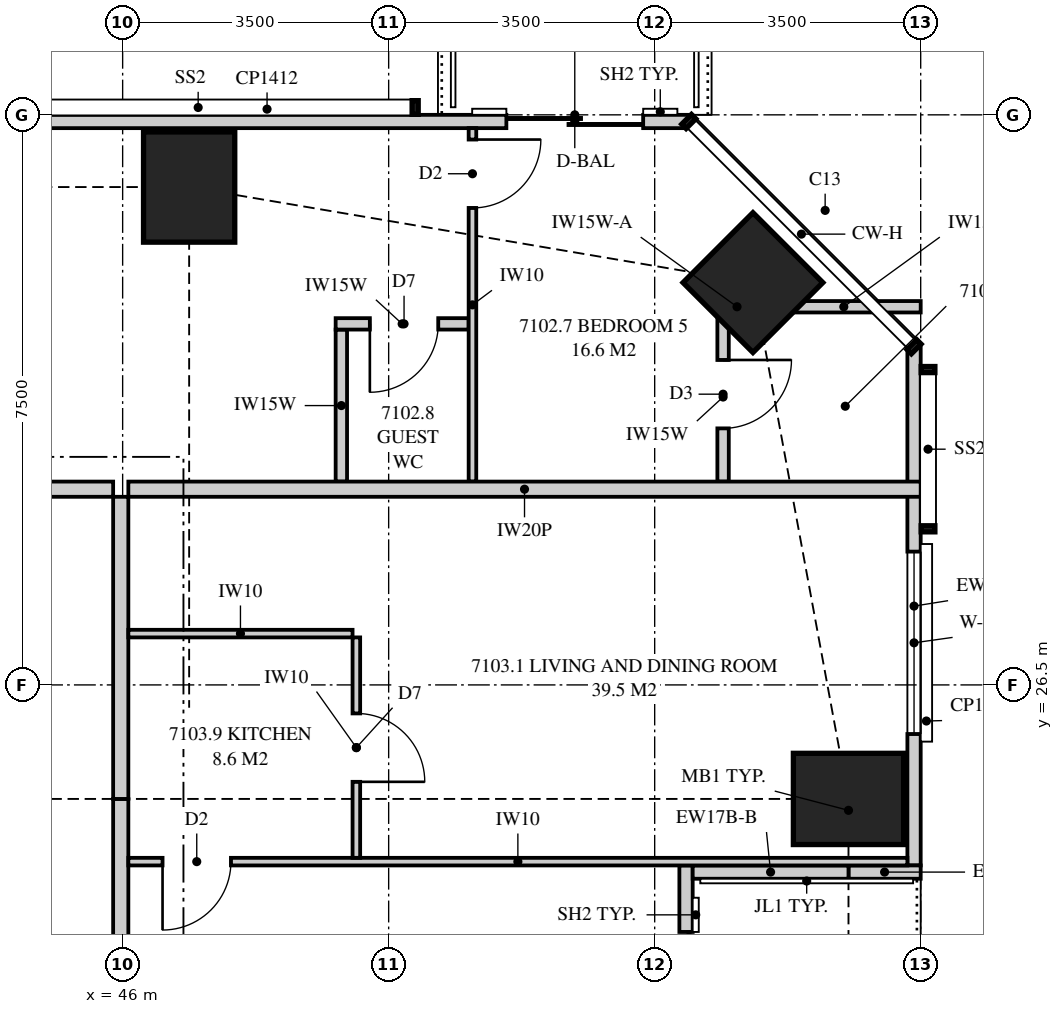
"""IFC4 building model, lengths in metres.
Left out: names, types, materials, properties, quantities, classifications, styles, units other than length and angle.
Written with IfcOpenShell. Run it as: python <this file> out.ifc"""

import sys

from ifc_helpers import new_model, si_unit, direction, frame, frame_2d, origin, origin_2d, place, context, subcontext, project, spatial, polyline, rectangle, outline, extrude, element, fill, save


model = new_model("IFC4")
c1 = context("Model", 3, precision=1e-05, world=origin(), true_north=direction((0.0, 1.0)))
c2 = subcontext(c1, "Body", "Model", "MODEL_VIEW")
j1 = project(units=[si_unit("LENGTHUNIT", "METRE"), si_unit("PLANEANGLEUNIT", "RADIAN")], contexts=[c1])
p1 = place(None, origin())
s1 = spatial("IfcSite", under=j1, at=p1, CompositionType="ELEMENT")
p2 = place(p1, origin())
s2 = spatial("IfcBuilding", under=s1, at=p2, CompositionType="ELEMENT")
p3 = place(p2, frame((0.0, 0.0, 259.95)))
s3 = spatial("IfcBuildingStorey", under=s2, at=p3, CompositionType="ELEMENT", Elevation=259.95)
p4 = place(p3, frame((55.55, 25.0, 0.0), z_axis=(0.0, 0.0, 1.0), x_axis=(1.0, 0.0, 0.0)))
e1 = element("IfcColumn", 1, at=p4, inside=s3, PredefinedType="COLUMN", context=c2, shape_type="SweptSolid", body=[
    extrude(rectangle(XDim=1.45, YDim=1.2, at=origin_2d()), origin(), (0.0, 0.0, 1.0), 3.9),
])
p5 = place(p3, frame((54.293, 31.793, 0.0), z_axis=(0.0, 0.0, 1.0), x_axis=(0.707106781187, 0.707106781187, 0.0)))
e2 = element("IfcColumn", 2, at=p5, inside=s3, PredefinedType="COLUMN", context=c2, shape_type="SweptSolid", body=[
    extrude(rectangle(XDim=1.3, YDim=1.3, at=origin_2d()), origin(), (0.0, 0.0, 1.0), 3.9),
])
p6 = place(p3, frame((46.875, 33.05, 0.0), z_axis=(0.0, 0.0, 1.0), x_axis=(0.0, 1.0, 0.0)))
e3 = element("IfcColumn", 3, at=p6, inside=s3, PredefinedType="COLUMN", context=c2, shape_type="SweptSolid", body=[
    extrude(rectangle(XDim=1.45, YDim=1.2, at=origin_2d()), origin(), (0.0, 0.0, 1.0), 3.9),
])
p7 = place(p3, frame((56.413, 24.125, 0.0), z_axis=(0.0, 0.0, 1.0), x_axis=(0.0, 1.0, 0.0)))
e4 = element("IfcWall", 4, at=p7, inside=s3, PredefinedType="SOLIDWALL", context=c2, shape_type="SweptSolid", body=[
    extrude(outline(polyline([(0.0, 0.0), (6.824, 0.0), (6.824, 3.66), (1.083, 3.66), (1.083, 2.7), (1.018, 2.7), (1.018, 3.66), (0.875, 3.66), (0.875, 2.7), (0.0, 2.7), (0.0, 0.0)])), frame((0.0, 0.087, 0.0), z_axis=(0.0, -1.0, 0.0), x_axis=(1.0, 0.0, 0.0)), (0.0, 0.0, 1.0), 0.175),
])
p8 = place(p7, frame((1.729, 0.0, 0.4)))
e5 = element("IfcOpeningElement", 5, at=p8, cuts=e4, PredefinedType="OPENING", context=c2, shape_type="SweptSolid", body=[
    extrude(rectangle(XDim=2.4, YDim=2.0, at=frame_2d((1.2, 1.0))), frame((0.0, 0.097, 0.0), z_axis=(0.0, -1.0, 0.0), x_axis=(1.0, 0.0, 0.0)), (0.0, 0.0, 1.0), 0.195),
])
p9 = place(p3, frame((53.413, 20.575, 0.0), z_axis=(0.0, 0.0, 1.0), x_axis=(0.0, 1.0, 0.0)))
e6 = element("IfcWall", 6, at=p9, inside=s3, PredefinedType="SOLIDWALL", context=c2, shape_type="SweptSolid", body=[
    extrude(outline(polyline([(0.0, 0.0), (3.55, 0.0), (3.55, 3.06), (3.225, 3.06), (3.225, 3.66), (0.0, 3.66), (0.0, 0.0)])), frame((0.0, 0.087, 0.0), z_axis=(0.0, -1.0, 0.0), x_axis=(1.0, 0.0, 0.0)), (0.0, 0.0, 1.0), 0.175),
])
p10 = place(p9, frame((0.875, 0.0, 0.0)))
e7 = element("IfcOpeningElement", 7, at=p10, cuts=e6, PredefinedType="OPENING", context=c2, shape_type="SweptSolid", body=[
    extrude(rectangle(XDim=1.8, YDim=2.4, at=frame_2d((0.9, 1.2))), frame((0.0, 0.097, 0.0), z_axis=(0.0, -1.0, 0.0), x_axis=(1.0, 0.0, 0.0)), (0.0, 0.0, 1.0), 0.195),
])
p11 = place(p3, frame((56.5, 24.038, 0.0), z_axis=(0.0, 0.0, 1.0), x_axis=(-1.0, 0.0, 0.0)))
e8 = element("IfcWall", 8, at=p11, inside=s3, PredefinedType="SOLIDWALL", context=c2, shape_type="SweptSolid", body=[
    extrude(outline(polyline([(0.0, 0.0), (0.95, 0.0), (0.95, 2.7), (0.15, 2.7), (0.15, 3.66), (0.0, 3.66), (0.0, 0.0)])), frame((0.0, 0.087, 0.0), z_axis=(0.0, -1.0, 0.0), x_axis=(1.0, 0.0, 0.0)), (0.0, 0.0, 1.0), 0.175),
])
p12 = place(p3, frame((55.55, 24.038, 0.0), z_axis=(0.0, 0.0, 1.0), x_axis=(-1.0, 0.0, 0.0)))
e9 = element("IfcWall", 9, at=p12, inside=s3, PredefinedType="SOLIDWALL", context=c2, shape_type="SweptSolid", body=[
    extrude(outline(polyline([(0.0, 0.0), (2.05, 0.0), (2.05, 3.06), (0.8, 3.06), (0.8, 2.7), (0.0, 2.7), (0.0, 0.0)])), frame((0.0, 0.087, 0.0), z_axis=(0.0, -1.0, 0.0), x_axis=(1.0, 0.0, 0.0)), (0.0, 0.0, 1.0), 0.175),
])
p13 = place(p3, frame((53.449, 33.913, 0.0), z_axis=(0.0, 0.0, 1.0), x_axis=(-1.0, 0.0, 0.0)))
e10 = element("IfcWall", 10, at=p13, inside=s3, PredefinedType="SOLIDWALL", context=c2, shape_type="SweptSolid", body=[
    extrude(outline(polyline([(0.0, 0.0), (33.597, 0.0), (33.597, 3.66), (26.039, 3.66), (26.039, 2.7), (25.955, 2.7), (25.955, 3.66), (25.824, 3.66), (25.824, 2.7), (6.574, 2.7), (6.574, 3.66), (6.442, 3.66), (6.442, 2.7), (6.359, 2.7), (6.359, 3.66), (0.0, 3.66), (0.0, 0.0)])), frame((0.0, 0.087, 0.0), z_axis=(0.0, -1.0, 0.0), x_axis=(1.0, 0.0, 0.0)), (0.0, 0.0, 1.0), 0.175),
])
p14 = place(p13, frame((0.6, 0.0, 0.0)))
e11 = element("IfcOpeningElement", 11, at=p14, cuts=e10, PredefinedType="OPENING", context=c2, shape_type="SweptSolid", body=[
    extrude(rectangle(XDim=1.8, YDim=2.4, at=frame_2d((0.9, 1.2))), frame((0.0, 0.097, 0.0), z_axis=(0.0, -1.0, 0.0), x_axis=(1.0, 0.0, 0.0)), (0.0, 0.0, 1.0), 0.195),
])
p15 = place(p13, frame((9.61, 0.0, 0.4)))
e12 = element("IfcOpeningElement", 12, at=p15, cuts=e10, PredefinedType="OPENING", context=c2, shape_type="SweptSolid", body=[
    extrude(rectangle(XDim=2.4, YDim=2.0, at=frame_2d((1.2, 1.0))), frame((0.0, 0.097, 0.0), z_axis=(0.0, -1.0, 0.0), x_axis=(1.0, 0.0, 0.0)), (0.0, 0.0, 1.0), 0.195),
])
p16 = place(p13, frame((19.524, 0.0, 0.4)))
e13 = element("IfcOpeningElement", 13, at=p16, cuts=e10, PredefinedType="OPENING", context=c2, shape_type="SweptSolid", body=[
    extrude(rectangle(XDim=2.1, YDim=2.25, at=frame_2d((1.05, 1.125))), frame((0.0, 0.097, 0.0), z_axis=(0.0, -1.0, 0.0), x_axis=(1.0, 0.0, 0.0)), (0.0, 0.0, 1.0), 0.195),
])
p17 = place(p13, frame((22.844, 0.0, 0.4)))
e14 = element("IfcOpeningElement", 14, at=p17, cuts=e10, PredefinedType="OPENING", context=c2, shape_type="SweptSolid", body=[
    extrude(rectangle(XDim=2.1, YDim=2.25, at=frame_2d((1.05, 1.125))), frame((0.0, 0.097, 0.0), z_axis=(0.0, -1.0, 0.0), x_axis=(1.0, 0.0, 0.0)), (0.0, 0.0, 1.0), 0.195),
])
p18 = place(p13, frame((29.123, 0.0, 0.4)))
e15 = element("IfcOpeningElement", 15, at=p18, cuts=e10, PredefinedType="OPENING", context=c2, shape_type="SweptSolid", body=[
    extrude(rectangle(XDim=2.1, YDim=2.25, at=frame_2d((1.05, 1.125))), frame((0.0, 0.097, 0.0), z_axis=(0.0, -1.0, 0.0), x_axis=(1.0, 0.0, 0.0)), (0.0, 0.0, 1.0), 0.195),
])
p19 = place(p3, frame((18.0, 29.075, 0.0), z_axis=(0.0, 0.0, 1.0), x_axis=(1.0, 0.0, 0.0)))
e16 = element("IfcWall", 16, at=p19, inside=s3, PredefinedType="PARTITIONING", context=c2, shape_type="SweptSolid", body=[
    extrude(outline(polyline([(0.0, 0.0), (27.875, 0.0), (27.875, 3.66), (27.875, 3.06), (27.565, 3.06), (27.565, 3.66), (20.56, 3.66), (20.56, 3.06), (17.94, 3.06), (17.94, 3.66), (10.935, 3.66), (10.935, 3.06), (8.315, 3.06), (8.315, 3.66), (2.192, 3.66), (2.192, 2.7), (0.256, 2.7), (0.256, 3.66), (0.0, 3.66), (0.0, 0.0)])), frame((0.0, 0.1, 0.0), z_axis=(0.0, -1.0, 0.0), x_axis=(1.0, 0.0, 0.0)), (0.0, 0.0, 1.0), 0.2),
])
p20 = place(p19, frame((18.75, 0.0, 0.0)))
e17 = element("IfcOpeningElement", 17, at=p20, cuts=e16, PredefinedType="OPENING", context=c2, shape_type="SweptSolid", body=[
    extrude(rectangle(XDim=1.05, YDim=2.2, at=frame_2d((0.525, 1.1))), frame((0.0, 0.11, 0.0), z_axis=(0.0, -1.0, 0.0), x_axis=(1.0, 0.0, 0.0)), (0.0, 0.0, 1.0), 0.22),
])
p21 = place(p3, frame((53.975, 31.475, 0.0), z_axis=(0.0, 0.0, 1.0), x_axis=(1.0, 0.0, 0.0)))
e18 = element("IfcWall", 18, at=p21, inside=s3, PredefinedType="PLUMBINGWALL", context=c2, shape_type="SweptSolid", body=[
    extrude(rectangle(XDim=0.217, YDim=0.15, at=frame_2d((0.108, 0.0))), origin(), (0.0, 0.0, 1.0), 2.7),
])
p22 = place(p3, frame((54.476, 31.475, 0.0), z_axis=(0.0, 0.0, 1.0), x_axis=(1.0, 0.0, 0.0)))
e19 = element("IfcWall", 19, at=p22, inside=s3, PredefinedType="PLUMBINGWALL", context=c2, shape_type="SweptSolid", body=[
    extrude(outline(polyline([(0.775, 3.66), (0.775, 2.7), (0.343, 2.7), (0.0, 1.35), (0.343, 0.0), (2.024, 0.0), (2.024, 3.66), (0.775, 3.66)])), frame((0.0, 0.075, 0.0), z_axis=(0.0, -1.0, 0.0), x_axis=(1.0, 0.0, 0.0)), (0.0, 0.0, 1.0), 0.15),
])
p23 = place(p3, frame((53.9, 31.4, 0.0), z_axis=(0.0, 0.0, 1.0), x_axis=(0.0, -1.0, 0.0)))
e20 = element("IfcWall", 20, at=p23, inside=s3, PredefinedType="PLUMBINGWALL", context=c2, shape_type="SweptSolid", body=[
    extrude(outline(polyline([(0.0, 0.0), (2.225, 0.0), (2.225, 3.66), (2.225, 2.7), (0.438, 2.7), (0.0, 2.7), (0.0, 3.66), (0.0, 0.0)])), frame((0.0, 0.075, 0.0), z_axis=(0.0, -1.0, 0.0), x_axis=(1.0, 0.0, 0.0)), (0.0, 0.0, 1.0), 0.15),
])
p24 = place(p23, frame((0.625, 0.0, 0.0)))
e21 = element("IfcOpeningElement", 21, at=p24, cuts=e20, PredefinedType="OPENING", context=c2, shape_type="SweptSolid", body=[
    extrude(rectangle(XDim=0.9, YDim=2.1, at=frame_2d((0.45, 1.05))), frame((0.0, 0.085, 0.0), z_axis=(0.0, -1.0, 0.0), x_axis=(1.0, 0.0, 0.0)), (0.0, 0.0, 1.0), 0.17),
])
p25 = place(p3, frame((50.603, 33.825, 0.0), z_axis=(0.0, 0.0, 1.0), x_axis=(0.0, -1.0, 0.0)))
e22 = element("IfcWall", 22, at=p25, inside=s3, PredefinedType="PARTITIONING", context=c2, shape_type="SweptSolid", body=[
    extrude(outline(polyline([(0.0, 0.0), (4.65, 0.0), (4.65, 3.66), (2.279, 3.66), (2.279, 2.7), (0.534, 2.7), (0.534, 3.66), (0.0, 3.66), (0.0, 0.0)])), frame((0.0, 0.05, 0.0), z_axis=(0.0, -1.0, 0.0), x_axis=(1.0, 0.0, 0.0)), (0.0, 0.0, 1.0), 0.1),
])
p26 = place(p25, frame((0.15, 0.0, 0.0)))
e23 = element("IfcOpeningElement", 23, at=p26, cuts=e22, PredefinedType="OPENING", context=c2, shape_type="SweptSolid", body=[
    extrude(rectangle(XDim=0.9, YDim=2.1, at=frame_2d((0.45, 1.05))), frame((0.0, 0.06, 0.0), z_axis=(0.0, -1.0, 0.0), x_axis=(1.0, 0.0, 0.0)), (0.0, 0.0, 1.0), 0.12),
])
p27 = place(p3, frame((46.075, 29.075, 0.0), z_axis=(0.0, 0.0, 1.0), x_axis=(1.0, 0.0, 0.0)))
e24 = element("IfcWall", 24, at=p27, inside=s3, PredefinedType="PARTITIONING", context=c2, shape_type="SweptSolid", body=[
    extrude(outline(polyline([(0.0, 0.0), (10.425, 0.0), (10.425, 3.66), (9.646, 3.66), (9.646, 2.7), (7.795, 2.7), (7.795, 3.66), (2.11, 3.66), (2.11, 3.06), (0.0, 3.06), (0.0, 3.66), (0.0, 0.0)])), frame((0.0, 0.1, 0.0), z_axis=(0.0, -1.0, 0.0), x_axis=(1.0, 0.0, 0.0)), (0.0, 0.0, 1.0), 0.2),
])
p28 = place(p3, frame((45.975, 13.0, 0.0), z_axis=(0.0, 0.0, 1.0), x_axis=(0.0, 1.0, 0.0)))
e25 = element("IfcWall", 25, at=p28, inside=s3, PredefinedType="PARTITIONING", context=c2, shape_type="SweptSolid", body=[
    extrude(outline(polyline([(0.0, 0.0), (12.0, 0.0), (12.0, 3.06), (10.69, 3.06), (10.69, 3.66), (7.06, 3.66), (7.06, 3.06), (4.44, 3.06), (4.44, 3.66), (1.31, 3.66), (1.31, 3.06), (0.0, 3.06), (0.0, 0.0)])), frame((0.0, 0.1, 0.0), z_axis=(0.0, -1.0, 0.0), x_axis=(1.0, 0.0, 0.0)), (0.0, 0.0, 1.0), 0.2),
])
p29 = place(p28, frame((7.925, 0.0, 0.0)))
e26 = element("IfcOpeningElement", 26, at=p29, cuts=e25, PredefinedType="OPENING", context=c2, shape_type="SweptSolid", body=[
    extrude(rectangle(XDim=1.05, YDim=2.2, at=frame_2d((0.525, 1.1))), frame((0.0, 0.11, 0.0), z_axis=(0.0, -1.0, 0.0), x_axis=(1.0, 0.0, 0.0)), (0.0, 0.0, 1.0), 0.22),
])
p30 = place(p3, frame((45.975, 25.0, 0.0), z_axis=(0.0, 0.0, 1.0), x_axis=(0.0, 1.0, 0.0)))
e27 = element("IfcWall", 27, at=p30, inside=s3, PredefinedType="PARTITIONING", context=c2, shape_type="SweptSolid", body=[
    extrude(rectangle(XDim=3.975, YDim=0.2, at=frame_2d((1.988, 0.0))), origin(), (0.0, 0.0, 1.0), 3.06),
])
p31 = place(p3, frame((56.325, 24.175, 0.0), z_axis=(0.0, 0.0, 1.0), x_axis=(-1.0, 0.0, 0.0)))
e28 = element("IfcWall", 28, at=p31, inside=s3, PredefinedType="PARTITIONING", context=c2, shape_type="SweptSolid", body=[
    extrude(outline(polyline([(0.0, 0.0), (10.25, 0.0), (10.25, 3.66), (10.25, 3.06), (1.635, 3.06), (1.635, 2.7), (0.0, 2.7), (0.0, 3.66), (0.0, 0.0)])), frame((0.0, 0.05, 0.0), z_axis=(0.0, -1.0, 0.0), x_axis=(1.0, 0.0, 0.0)), (0.0, 0.0, 1.0), 0.1),
])
p32 = place(p31, frame((8.9, 0.0, 0.0)))
e29 = element("IfcOpeningElement", 29, at=p32, cuts=e28, PredefinedType="OPENING", context=c2, shape_type="SweptSolid", body=[
    extrude(rectangle(XDim=0.9, YDim=2.1, at=frame_2d((0.45, 1.05))), frame((0.0, 0.06, 0.0), z_axis=(0.0, -1.0, 0.0), x_axis=(1.0, 0.0, 0.0)), (0.0, 0.0, 1.0), 0.12),
])
p33 = place(p3, frame((49.075, 24.225, 0.0), z_axis=(0.0, 0.0, 1.0), x_axis=(0.0, 1.0, 0.0)))
e30 = element("IfcWall", 30, at=p33, inside=s3, PredefinedType="PARTITIONING", context=c2, shape_type="SweptSolid", body=[
    extrude(outline(polyline([(0.0, 0.0), (2.9, 0.0), (2.9, 3.66), (2.035, 3.66), (2.035, 3.06), (0.0, 3.06), (0.0, 3.66), (0.0, 0.0)])), frame((0.0, 0.05, 0.0), z_axis=(0.0, -1.0, 0.0), x_axis=(1.0, 0.0, 0.0)), (0.0, 0.0, 1.0), 0.1),
])
p34 = place(p33, frame((1.0, 0.0, 0.0)))
e31 = element("IfcOpeningElement", 31, at=p34, cuts=e30, PredefinedType="OPENING", context=c2, shape_type="SweptSolid", body=[
    extrude(rectangle(XDim=0.9, YDim=2.1, at=frame_2d((0.45, 1.05))), frame((0.0, 0.06, 0.0), z_axis=(0.0, -1.0, 0.0), x_axis=(1.0, 0.0, 0.0)), (0.0, 0.0, 1.0), 0.12),
])
p35 = place(p3, frame((49.025, 27.175, 0.0), z_axis=(0.0, 0.0, 1.0), x_axis=(-1.0, 0.0, 0.0)))
e32 = element("IfcWall", 32, at=p35, inside=s3, PredefinedType="PARTITIONING", context=c2, shape_type="SweptSolid", body=[
    extrude(outline(polyline([(0.0, 0.0), (2.95, 0.0), (2.95, 3.66), (2.95, 3.06), (0.89, 3.06), (0.89, 3.66), (0.0, 3.66), (0.0, 0.0)])), frame((0.0, 0.05, 0.0), z_axis=(0.0, -1.0, 0.0), x_axis=(1.0, 0.0, 0.0)), (0.0, 0.0, 1.0), 0.1),
])
p36 = place(p3, frame((50.552, 31.25, 0.0), z_axis=(0.0, 0.0, 1.0), x_axis=(-1.0, 0.0, 0.0)))
e33 = element("IfcWall", 33, at=p36, inside=s3, PredefinedType="PLUMBINGWALL", context=c2, shape_type="SweptSolid", body=[
    extrude(rectangle(XDim=1.75, YDim=0.15, at=frame_2d((0.875, 0.0))), origin(), (0.0, 0.0, 1.0), 3.66),
])
p37 = place(p36, frame((0.4, 0.0, 0.0)))
e34 = element("IfcOpeningElement", 34, at=p37, cuts=e33, PredefinedType="OPENING", context=c2, shape_type="SweptSolid", body=[
    extrude(rectangle(XDim=0.9, YDim=2.1, at=frame_2d((0.45, 1.05))), frame((0.0, 0.085, 0.0), z_axis=(0.0, -1.0, 0.0), x_axis=(1.0, 0.0, 0.0)), (0.0, 0.0, 1.0), 0.17),
])
p38 = place(p3, frame((48.877, 29.175, 0.0), z_axis=(0.0, 0.0, 1.0), x_axis=(0.0, 1.0, 0.0)))
e35 = element("IfcWall", 35, at=p38, inside=s3, PredefinedType="PLUMBINGWALL", context=c2, shape_type="SweptSolid", body=[
    extrude(rectangle(XDim=2.0, YDim=0.15, at=frame_2d((1.0, 0.0))), origin(), (0.0, 0.0, 1.0), 3.66),
])
p39 = place(p10, origin())
e36 = element("IfcDoor", 36, at=p39, inside=s3, OperationType="SLIDING_TO_LEFT", PredefinedType="DOOR", context=c2, shape_type="SweptSolid", body=[
    extrude(rectangle(XDim=1.8, YDim=2.4, at=frame_2d((0.9, 1.2))), frame((0.0, 0.025, 0.0), z_axis=(0.0, -1.0, 0.0), x_axis=(1.0, 0.0, 0.0)), (0.0, 0.0, 1.0), 0.05),
])
fill(e7, e36)
p40 = place(p8, origin())
e37 = element("IfcWindow", 37, at=p40, inside=s3, PartitioningType="SINGLE_PANEL", PredefinedType="WINDOW", context=c2, shape_type="SweptSolid", body=[
    extrude(rectangle(XDim=2.4, YDim=2.0, at=frame_2d((1.2, 1.0))), frame((0.0, 0.03, 0.0), z_axis=(0.0, -1.0, 0.0), x_axis=(1.0, 0.0, 0.0)), (0.0, 0.0, 1.0), 0.06),
])
fill(e5, e37)
p41 = place(p14, origin())
e38 = element("IfcDoor", 38, at=p41, inside=s3, OperationType="SLIDING_TO_LEFT", PredefinedType="DOOR", context=c2, shape_type="SweptSolid", body=[
    extrude(rectangle(XDim=1.8, YDim=2.4, at=frame_2d((0.9, 1.2))), frame((0.0, 0.025, 0.0), z_axis=(0.0, -1.0, 0.0), x_axis=(1.0, 0.0, 0.0)), (0.0, 0.0, 1.0), 0.05),
])
fill(e11, e38)
p42 = place(p24, origin())
e39 = element("IfcDoor", 39, at=p42, inside=s3, OperationType="SINGLE_SWING_LEFT", PredefinedType="DOOR", context=c2, shape_type="SweptSolid", body=[
    extrude(rectangle(XDim=0.9, YDim=2.1, at=frame_2d((0.45, 1.05))), frame((0.0, 0.025, 0.0), z_axis=(0.0, -1.0, 0.0), x_axis=(1.0, 0.0, 0.0)), (0.0, 0.0, 1.0), 0.05),
])
fill(e21, e39)
p43 = place(p26, origin())
e40 = element("IfcDoor", 40, at=p43, inside=s3, OperationType="SINGLE_SWING_LEFT", PredefinedType="DOOR", context=c2, shape_type="SweptSolid", body=[
    extrude(rectangle(XDim=0.9, YDim=2.1, at=frame_2d((0.45, 1.05))), frame((0.0, 0.025, 0.0), z_axis=(0.0, -1.0, 0.0), x_axis=(1.0, 0.0, 0.0)), (0.0, 0.0, 1.0), 0.05),
])
fill(e23, e40)
p44 = place(p32, origin())
e41 = element("IfcDoor", 41, at=p44, inside=s3, OperationType="SINGLE_SWING_RIGHT", PredefinedType="DOOR", context=c2, shape_type="SweptSolid", body=[
    extrude(rectangle(XDim=0.9, YDim=2.1, at=frame_2d((0.45, 1.05))), frame((0.0, 0.025, 0.0), z_axis=(0.0, -1.0, 0.0), x_axis=(1.0, 0.0, 0.0)), (0.0, 0.0, 1.0), 0.05),
])
fill(e29, e41)
p45 = place(p34, frame((0.9, 0.0, 0.0), z_axis=(0.0, 0.0, 1.0), x_axis=(-1.0, 0.0, 0.0)))
e42 = element("IfcDoor", 42, at=p45, inside=s3, OperationType="SINGLE_SWING_RIGHT", PredefinedType="DOOR", context=c2, shape_type="SweptSolid", body=[
    extrude(rectangle(XDim=0.9, YDim=2.1, at=frame_2d((0.45, 1.05))), frame((0.0, 0.025, 0.0), z_axis=(0.0, -1.0, 0.0), x_axis=(1.0, 0.0, 0.0)), (0.0, 0.0, 1.0), 0.05),
])
fill(e31, e42)
p46 = place(p37, origin())
e43 = element("IfcDoor", 43, at=p46, inside=s3, OperationType="SINGLE_SWING_RIGHT", PredefinedType="DOOR", context=c2, shape_type="SweptSolid", body=[
    extrude(rectangle(XDim=0.9, YDim=2.1, at=frame_2d((0.45, 1.05))), frame((0.0, 0.025, 0.0), z_axis=(0.0, -1.0, 0.0), x_axis=(1.0, 0.0, 0.0)), (0.0, 0.0, 1.0), 0.05),
])
fill(e34, e43)
save(model, sys.argv[1])
